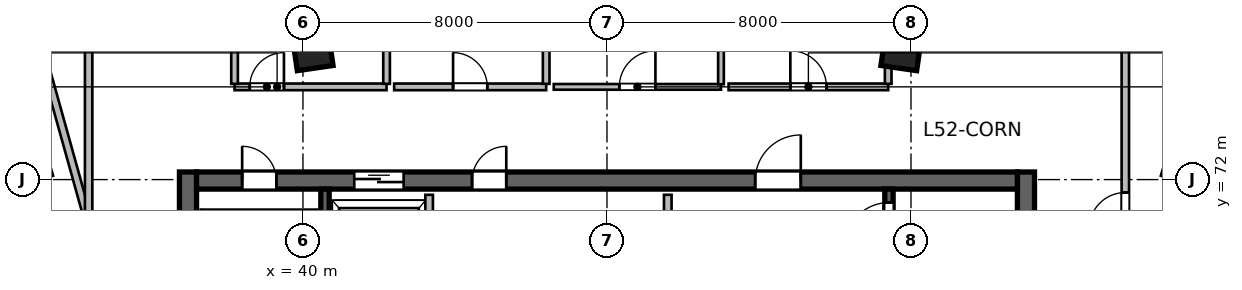
"""IFC4 building model, lengths in metres.
Left out: names, types, materials, properties, quantities, classifications, styles, units other than length and angle.
Written with IfcOpenShell. Run it as: python <this file> out.ifc"""

import sys

from ifc_helpers import new_model, si_unit, direction, frame, frame_2d, origin, origin_2d, place, context, subcontext, project, spatial, rectangle, extrude, source, transform, mapped, element, fill, save


model = new_model("IFC4")
c1 = context("Model", 3, precision=1e-05, world=origin(), true_north=direction((0.0, 1.0)))
c2 = subcontext(c1, "Body", "Model", "MODEL_VIEW")
j1 = project(units=[si_unit("LENGTHUNIT", "METRE"), si_unit("PLANEANGLEUNIT", "RADIAN")], contexts=[c1])
p1 = place(None, origin())
s1 = spatial("IfcSite", under=j1, at=p1, CompositionType="ELEMENT")
p2 = place(p1, origin())
s2 = spatial("IfcBuilding", under=s1, at=p2, CompositionType="ELEMENT")
p3 = place(p2, frame((0.0, 0.0, 215.7)))
s3 = spatial("IfcBuildingStorey", under=s2, at=p3, CompositionType="ELEMENT", Elevation=215.7)
m1 = source(origin(), c2, "Body", "SweptSolid", [
    extrude(rectangle(XDim=12.0, YDim=0.45, at=frame_2d((6.0, 0.0))), origin(), (0.0, 0.0, 1.0), 3.9),
])
for number, where, z_axis, x_axis in (
    (1, (36.975, 60.2, 0.0), (0.0, 0.0, 1.0), (0.0, 1.0, 0.0)),
    (2, (59.025, 60.2, 0.0), (0.0, 0.0, 1.0), (0.0, 1.0, 0.0)),
):
    element("IfcWall", number, at=place(p3, frame(where, z_axis=z_axis, x_axis=x_axis)), inside=s3, PredefinedType="SHEAR", context=c2, shape_type="MappedRepresentation", body=[
        mapped(m1, transform((0.0, 0.0, 0.0), scale=1.0)),
    ])
m2 = source(origin(), c2, "Body", "SweptSolid", [
    extrude(rectangle(XDim=21.6, YDim=0.45, at=frame_2d((10.8, 0.0))), origin(), (0.0, 0.0, 1.0), 3.9),
])
p4 = place(p3, frame((37.2, 71.975, 0.0), z_axis=(0.0, 0.0, 1.0), x_axis=(1.0, 0.0, 0.0)))
e3 = element("IfcWall", 3, at=p4, inside=s3, PredefinedType="SHEAR", context=c2, shape_type="MappedRepresentation", body=[
    mapped(m2, transform((0.0, 0.0, 0.0), scale=1.0)),
])
p5 = place(p4, frame((1.2, 0.0, 0.0)))
e4 = element("IfcOpeningElement", 4, at=p5, cuts=e3, PredefinedType="OPENING", context=c2, shape_type="SweptSolid", body=[
    extrude(rectangle(XDim=0.9, YDim=2.1, at=frame_2d((0.45, 1.05))), frame((0.0, 0.235, 0.0), z_axis=(0.0, -1.0, 0.0), x_axis=(1.0, 0.0, 0.0)), (0.0, 0.0, 1.0), 0.47),
])
p6 = place(p4, frame((14.7, 0.0, 0.0)))
e5 = element("IfcOpeningElement", 5, at=p6, cuts=e3, PredefinedType="OPENING", context=c2, shape_type="SweptSolid", body=[
    extrude(rectangle(XDim=1.2, YDim=2.15, at=frame_2d((0.6, 1.075))), frame((0.0, 0.235, 0.0), z_axis=(0.0, -1.0, 0.0), x_axis=(1.0, 0.0, 0.0)), (0.0, 0.0, 1.0), 0.47),
])
p7 = place(p4, frame((4.15, 0.0, 0.0)))
e6 = element("IfcOpeningElement", 6, at=p7, cuts=e3, PredefinedType="OPENING", context=c2, shape_type="SweptSolid", body=[
    extrude(rectangle(XDim=1.3, YDim=2.15, at=frame_2d((0.65, 1.075))), frame((0.0, 0.235, 0.0), z_axis=(0.0, -1.0, 0.0), x_axis=(1.0, 0.0, 0.0)), (0.0, 0.0, 1.0), 0.47),
])
p8 = place(p4, frame((7.25, 0.0, 0.0)))
e7 = element("IfcOpeningElement", 7, at=p8, cuts=e3, PredefinedType="OPENING", context=c2, shape_type="SweptSolid", body=[
    extrude(rectangle(XDim=0.9, YDim=2.1, at=frame_2d((0.45, 1.05))), frame((0.0, 0.235, 0.0), z_axis=(0.0, -1.0, 0.0), x_axis=(1.0, 0.0, 0.0)), (0.0, 0.0, 1.0), 0.47),
])
m3 = source(origin(), c2, "Body", "SweptSolid", [
    extrude(rectangle(XDim=11.1, YDim=0.22, at=frame_2d((5.55, 0.0))), origin(), (0.0, 0.0, 1.0), 3.9),
])
p9 = place(p3, frame((40.58, 60.65, 0.0), z_axis=(0.0, 0.0, 1.0), x_axis=(0.0, 1.0, 0.0)))
e8 = element("IfcWall", 8, at=p9, inside=s3, PredefinedType="SHEAR", context=c2, shape_type="MappedRepresentation", body=[
    mapped(m3, transform((0.0, 0.0, 0.0), scale=1.0)),
])
p10 = place(p3, frame((55.42, 60.65, 0.0), z_axis=(0.0, 0.0, 1.0), x_axis=(0.0, 1.0, 0.0)))
e9 = element("IfcWall", 9, at=p10, inside=s3, PredefinedType="SHEAR", context=c2, shape_type="MappedRepresentation", body=[
    mapped(m3, transform((0.0, 0.0, 0.0), scale=1.0)),
])
p11 = place(p10, frame((9.595, 0.0, 0.0)))
e10 = element("IfcOpeningElement", 10, at=p11, cuts=e9, PredefinedType="OPENING", context=c2, shape_type="SweptSolid", body=[
    extrude(rectangle(XDim=1.15, YDim=2.15, at=frame_2d((0.575, 1.075))), frame((0.0, 0.12, 0.0), z_axis=(0.0, -1.0, 0.0), x_axis=(1.0, 0.0, 0.0)), (0.0, 0.0, 1.0), 0.24),
])
m4 = source(origin(), c2, "Body", "SweptSolid", [
    extrude(rectangle(XDim=0.95, YDim=0.95, at=origin_2d()), origin(), (0.0, 0.0, 1.0), 3.9),
])
for number, where, z_axis, x_axis in (
    (11, (40.253, 75.404, 0.0), (0.0, 0.0, 1.0), (-0.143, 0.99, 0.0)),
    (12, (55.747, 75.404, 0.0), (0.0, 0.0, 1.0), (0.143, 0.99, 0.0)),
):
    element("IfcColumn", number, at=place(p3, frame(where, z_axis=z_axis, x_axis=x_axis)), inside=s3, PredefinedType="COLUMN", context=c2, shape_type="MappedRepresentation", body=[
        mapped(m4, transform((0.0, 0.0, 0.0), scale=1.0)),
    ])
m5 = source(origin(), c2, "Body", "SweptSolid", [
    extrude(rectangle(XDim=5.8, YDim=0.2, at=frame_2d((2.9, 0.0))), origin(), (0.0, 0.0, 1.0), 3.64),
])
p12 = place(p3, frame((49.6, 65.8, 0.0), z_axis=(0.0, 0.0, 1.0), x_axis=(0.0, 1.0, 0.0)))
e13 = element("IfcWall", 13, at=p12, inside=s3, PredefinedType="SOLIDWALL", context=c2, shape_type="MappedRepresentation", body=[
    mapped(m5, transform((0.0, 0.0, 0.0), scale=1.0)),
])
m6 = source(origin(), c2, "Body", "SweptSolid", [
    extrude(rectangle(XDim=3.2, YDim=0.2, at=frame_2d((1.6, 0.0))), origin(), (0.0, 0.0, 1.0), 3.64),
])
p13 = place(p3, frame((43.32, 68.4, 0.0), z_axis=(0.0, 0.0, 1.0), x_axis=(0.0, 1.0, 0.0)))
e14 = element("IfcWall", 14, at=p13, inside=s3, PredefinedType="SOLIDWALL", context=c2, shape_type="MappedRepresentation", body=[
    mapped(m6, transform((0.0, 0.0, 0.0), scale=1.0)),
])
m7 = source(origin(), c2, "Body", "SweptSolid", [
    extrude(rectangle(XDim=4.0, YDim=0.175, at=frame_2d((2.0, 0.0))), origin(), (0.0, 0.0, 1.0), 3.64),
])
p14 = place(p3, frame((38.2, 74.44, 0.0), z_axis=(0.0, 0.0, 1.0), x_axis=(1.0, 0.0, 0.0)))
e15 = element("IfcWall", 15, at=p14, inside=s3, PredefinedType="PARTITIONING", context=c2, shape_type="MappedRepresentation", body=[
    mapped(m7, transform((0.0, 0.0, 0.0), scale=1.0)),
])
p15 = place(p14, frame((0.4, 0.0, 0.0)))
e16 = element("IfcOpeningElement", 16, at=p15, cuts=e15, PredefinedType="OPENING", context=c2, shape_type="SweptSolid", body=[
    extrude(rectangle(XDim=0.9, YDim=2.08, at=frame_2d((0.45, 1.04))), frame((0.0, 0.098, 0.0), z_axis=(0.0, -1.0, 0.0), x_axis=(1.0, 0.0, 0.0)), (0.0, 0.0, 1.0), 0.195),
])
m8 = source(origin(), c2, "Body", "SweptSolid", [
    extrude(rectangle(XDim=2.403, YDim=0.175, at=frame_2d((1.201, 0.0))), origin(), (0.0, 0.0, 1.0), 3.64),
])
for number, where, z_axis, x_axis in (
    (17, (38.2, 74.519, 0.0), (0.0, 0.0, 1.0), (0.0, 1.0, 0.0)),
    (18, (42.2, 74.519, 0.0), (0.0, 0.0, 1.0), (0.0, 1.0, 0.0)),
):
    element("IfcWall", number, at=place(p3, frame(where, z_axis=z_axis, x_axis=x_axis)), inside=s3, PredefinedType="PARTITIONING", context=c2, shape_type="MappedRepresentation", body=[
        mapped(m8, transform((0.0, 0.0, 0.0), scale=1.0)),
    ])
p16 = place(p3, frame((42.4, 74.44, 0.0), z_axis=(0.0, 0.0, 1.0), x_axis=(1.0, 0.0, 0.0)))
e19 = element("IfcWall", 19, at=p16, inside=s3, PredefinedType="PARTITIONING", context=c2, shape_type="MappedRepresentation", body=[
    mapped(m7, transform((0.0, 0.0, 0.0), scale=1.0)),
])
p17 = place(p16, frame((1.55, 0.0, 0.0)))
e20 = element("IfcOpeningElement", 20, at=p17, cuts=e19, PredefinedType="OPENING", context=c2, shape_type="SweptSolid", body=[
    extrude(rectangle(XDim=0.9, YDim=2.08, at=frame_2d((0.45, 1.04))), frame((0.0, 0.098, 0.0), z_axis=(0.0, -1.0, 0.0), x_axis=(1.0, 0.0, 0.0)), (0.0, 0.0, 1.0), 0.195),
])
p18 = place(p3, frame((46.4, 74.519, 0.0), z_axis=(0.0, 0.0, 1.0), x_axis=(0.0, 1.0, 0.0)))
e21 = element("IfcWall", 21, at=p18, inside=s3, PredefinedType="PARTITIONING", context=c2, shape_type="MappedRepresentation", body=[
    mapped(m8, transform((0.0, 0.0, 0.0), scale=1.0)),
])
m9 = source(origin(), c2, "Body", "SweptSolid", [
    extrude(rectangle(XDim=4.4, YDim=0.15, at=frame_2d((2.2, 0.0))), origin(), (0.0, 0.0, 1.0), 3.64),
])
p19 = place(p3, frame((46.6, 74.44, 0.0), z_axis=(0.0, 0.0, 1.0), x_axis=(1.0, 0.0, 0.0)))
e22 = element("IfcWall", 22, at=p19, inside=s3, PredefinedType="PARTITIONING", context=c2, shape_type="MappedRepresentation", body=[
    mapped(m9, transform((0.0, 0.0, 0.0), scale=1.0)),
])
p20 = place(p19, frame((1.725, 0.0, 0.0)))
e23 = element("IfcOpeningElement", 23, at=p20, cuts=e22, PredefinedType="OPENING", context=c2, shape_type="SweptSolid", body=[
    extrude(rectangle(XDim=0.95, YDim=2.1, at=frame_2d((0.475, 1.05))), frame((0.0, 0.085, 0.0), z_axis=(0.0, -1.0, 0.0), x_axis=(1.0, 0.0, 0.0)), (0.0, 0.0, 1.0), 0.17),
])
m10 = source(origin(), c2, "Body", "SweptSolid", [
    extrude(rectangle(XDim=2.425, YDim=0.15, at=frame_2d((1.212, 0.0))), origin(), (0.0, 0.0, 1.0), 3.64),
])
p21 = place(p3, frame((51.0, 74.508, 0.0), z_axis=(0.0, 0.0, 1.0), x_axis=(0.0, 1.0, 0.0)))
e24 = element("IfcWall", 24, at=p21, inside=s3, PredefinedType="PARTITIONING", context=c2, shape_type="MappedRepresentation", body=[
    mapped(m10, transform((0.0, 0.0, 0.0), scale=1.0)),
])
m11 = source(origin(), c2, "Body", "SweptSolid", [
    extrude(rectangle(XDim=4.2, YDim=0.175, at=frame_2d((2.1, 0.0))), origin(), (0.0, 0.0, 1.0), 3.64),
])
p22 = place(p3, frame((51.2, 74.44, 0.0), z_axis=(0.0, 0.0, 1.0), x_axis=(1.0, 0.0, 0.0)))
e25 = element("IfcWall", 25, at=p22, inside=s3, PredefinedType="PARTITIONING", context=c2, shape_type="MappedRepresentation", body=[
    mapped(m11, transform((0.0, 0.0, 0.0), scale=1.0)),
])
p23 = place(p22, frame((1.625, 0.0, 0.0)))
e26 = element("IfcOpeningElement", 26, at=p23, cuts=e25, PredefinedType="OPENING", context=c2, shape_type="SweptSolid", body=[
    extrude(rectangle(XDim=0.95, YDim=2.12, at=frame_2d((0.475, 1.06))), frame((0.0, 0.098, 0.0), z_axis=(0.0, -1.0, 0.0), x_axis=(1.0, 0.0, 0.0)), (0.0, 0.0, 1.0), 0.195),
])
p24 = place(p3, frame((55.4, 74.519, 0.0), z_axis=(0.0, 0.0, 1.0), x_axis=(0.0, 1.0, 0.0)))
e27 = element("IfcWall", 27, at=p24, inside=s3, PredefinedType="PARTITIONING", context=c2, shape_type="MappedRepresentation", body=[
    mapped(m8, transform((0.0, 0.0, 0.0), scale=1.0)),
])
m12 = source(origin(), c2, "Body", "SweptSolid", [
    extrude(rectangle(XDim=13.694, YDim=0.195, at=frame_2d((6.847, 0.0))), origin(), (0.0, 0.0, 1.0), 3.64),
])
p25 = place(p3, frame((36.5, 63.216, 0.0), z_axis=(0.0, 0.0, 1.0), x_axis=(-0.268753576604, 0.963208967495, 0.0)))
e28 = element("IfcWall", 28, at=p25, inside=s3, PredefinedType="PARTITIONING", context=c2, shape_type="MappedRepresentation", body=[
    mapped(m12, transform((0.0, 0.0, 0.0), scale=1.0)),
])
m13 = source(origin(), c2, "Body", "SweptSolid", [
    extrude(rectangle(XDim=19.209, YDim=0.195, at=frame_2d((9.604, 0.0))), origin(), (0.0, 0.0, 1.0), 3.64),
])
p26 = place(p3, frame((34.36, 57.96, 0.0), z_axis=(0.0, 0.0, 1.0), x_axis=(0.0, 1.0, 0.0)))
e29 = element("IfcWall", 29, at=p26, inside=s3, PredefinedType="PARTITIONING", context=c2, shape_type="MappedRepresentation", body=[
    mapped(m13, transform((0.0, 0.0, 0.0), scale=1.0)),
])
m14 = source(origin(), c2, "Body", "SweptSolid", [
    extrude(rectangle(XDim=11.969, YDim=0.195, at=frame_2d((5.984, 0.0))), origin(), (0.0, 0.0, 1.0), 3.64),
])
p27 = place(p3, frame((61.64, 65.2, 0.0), z_axis=(0.0, 0.0, 1.0), x_axis=(0.0, 1.0, 0.0)))
e30 = element("IfcWall", 30, at=p27, inside=s3, PredefinedType="PARTITIONING", context=c2, shape_type="MappedRepresentation", body=[
    mapped(m14, transform((0.0, 0.0, 0.0), scale=1.0)),
])
p28 = place(p27, frame((5.51, 0.0, 0.0)))
e31 = element("IfcOpeningElement", 31, at=p28, cuts=e30, PredefinedType="OPENING", context=c2, shape_type="SweptSolid", body=[
    extrude(rectangle(XDim=0.95, YDim=2.1, at=frame_2d((0.475, 1.05))), frame((0.0, 0.107, 0.0), z_axis=(0.0, -1.0, 0.0), x_axis=(1.0, 0.0, 0.0)), (0.0, 0.0, 1.0), 0.215),
])
m15 = source(origin(), c2, "Body", "SweptSolid", [
    extrude(rectangle(XDim=0.9, YDim=2.1, at=frame_2d((0.45, 1.05))), frame((0.0, 0.025, 0.0), z_axis=(0.0, -1.0, 0.0), x_axis=(1.0, 0.0, 0.0)), (0.0, 0.0, 1.0), 0.05),
])
p29 = place(p5, origin())
e32 = element("IfcDoor", 32, at=p29, inside=s3, OperationType="SINGLE_SWING_LEFT", PredefinedType="DOOR", context=c2, shape_type="MappedRepresentation", body=[
    mapped(m15, transform((0.0, 0.0, 0.0), scale=1.0)),
])
fill(e4, e32)
m16 = source(origin(), c2, "Body", "SweptSolid", [
    extrude(rectangle(XDim=1.15, YDim=2.15, at=frame_2d((0.575, 1.075))), frame((0.0, 0.025, 0.0), z_axis=(0.0, -1.0, 0.0), x_axis=(1.0, 0.0, 0.0)), (0.0, 0.0, 1.0), 0.05),
])
p30 = place(p11, origin())
e33 = element("IfcDoor", 33, at=p30, inside=s3, OperationType="SINGLE_SWING_LEFT", PredefinedType="DOOR", context=c2, shape_type="MappedRepresentation", body=[
    mapped(m16, transform((0.0, 0.0, 0.0), scale=1.0)),
])
fill(e10, e33)
m17 = source(origin(), c2, "Body", "SweptSolid", [
    extrude(rectangle(XDim=1.2, YDim=2.15, at=frame_2d((0.6, 1.075))), frame((0.0, 0.025, 0.0), z_axis=(0.0, -1.0, 0.0), x_axis=(1.0, 0.0, 0.0)), (0.0, 0.0, 1.0), 0.05),
])
p31 = place(p6, origin())
e34 = element("IfcDoor", 34, at=p31, inside=s3, OperationType="SINGLE_SWING_RIGHT", PredefinedType="DOOR", context=c2, shape_type="MappedRepresentation", body=[
    mapped(m17, transform((0.0, 0.0, 0.0), scale=1.0)),
])
fill(e5, e34)
m18 = source(origin(), c2, "Body", "SweptSolid", [
    extrude(rectangle(XDim=1.3, YDim=2.15, at=frame_2d((0.65, 1.075))), frame((0.0, 0.025, 0.0), z_axis=(0.0, -1.0, 0.0), x_axis=(1.0, 0.0, 0.0)), (0.0, 0.0, 1.0), 0.05),
])
p32 = place(p7, origin())
e35 = element("IfcDoor", 35, at=p32, inside=s3, OperationType="DOUBLE_DOOR_SLIDING", PredefinedType="DOOR", context=c2, shape_type="MappedRepresentation", body=[
    mapped(m18, transform((0.0, 0.0, 0.0), scale=1.0)),
])
fill(e6, e35)
p33 = place(p8, origin())
e36 = element("IfcDoor", 36, at=p33, inside=s3, OperationType="SINGLE_SWING_RIGHT", PredefinedType="DOOR", context=c2, shape_type="MappedRepresentation", body=[
    mapped(m15, transform((0.0, 0.0, 0.0), scale=1.0)),
])
fill(e7, e36)
m19 = source(origin(), c2, "Body", "SweptSolid", [
    extrude(rectangle(XDim=0.9, YDim=2.08, at=frame_2d((0.45, 1.04))), frame((0.0, 0.025, 0.0), z_axis=(0.0, -1.0, 0.0), x_axis=(1.0, 0.0, 0.0)), (0.0, 0.0, 1.0), 0.05),
])
p34 = place(p15, origin())
e37 = element("IfcDoor", 37, at=p34, inside=s3, OperationType="SINGLE_SWING_RIGHT", PredefinedType="DOOR", context=c2, shape_type="MappedRepresentation", body=[
    mapped(m19, transform((0.0, 0.0, 0.0), scale=1.0)),
])
fill(e16, e37)
p35 = place(p17, origin())
e38 = element("IfcDoor", 38, at=p35, inside=s3, OperationType="SINGLE_SWING_LEFT", PredefinedType="DOOR", context=c2, shape_type="MappedRepresentation", body=[
    mapped(m19, transform((0.0, 0.0, 0.0), scale=1.0)),
])
fill(e20, e38)
m20 = source(origin(), c2, "Body", "SweptSolid", [
    extrude(rectangle(XDim=0.95, YDim=2.1, at=frame_2d((0.475, 1.05))), frame((0.0, 0.025, 0.0), z_axis=(0.0, -1.0, 0.0), x_axis=(1.0, 0.0, 0.0)), (0.0, 0.0, 1.0), 0.05),
])
p36 = place(p20, origin())
e39 = element("IfcDoor", 39, at=p36, inside=s3, OperationType="SINGLE_SWING_RIGHT", PredefinedType="DOOR", context=c2, shape_type="MappedRepresentation", body=[
    mapped(m20, transform((0.0, 0.0, 0.0), scale=1.0)),
])
fill(e23, e39)
m21 = source(origin(), c2, "Body", "SweptSolid", [
    extrude(rectangle(XDim=0.95, YDim=2.12, at=frame_2d((0.475, 1.06))), frame((0.0, 0.025, 0.0), z_axis=(0.0, -1.0, 0.0), x_axis=(1.0, 0.0, 0.0)), (0.0, 0.0, 1.0), 0.05),
])
p37 = place(p23, origin())
e40 = element("IfcDoor", 40, at=p37, inside=s3, OperationType="SINGLE_SWING_LEFT", PredefinedType="DOOR", context=c2, shape_type="MappedRepresentation", body=[
    mapped(m21, transform((0.0, 0.0, 0.0), scale=1.0)),
])
fill(e26, e40)
p38 = place(p28, origin())
e41 = element("IfcDoor", 41, at=p38, inside=s3, OperationType="SINGLE_SWING_LEFT", PredefinedType="DOOR", context=c2, shape_type="MappedRepresentation", body=[
    mapped(m20, transform((0.0, 0.0, 0.0), scale=1.0)),
])
fill(e31, e41)
save(model, sys.argv[1])
